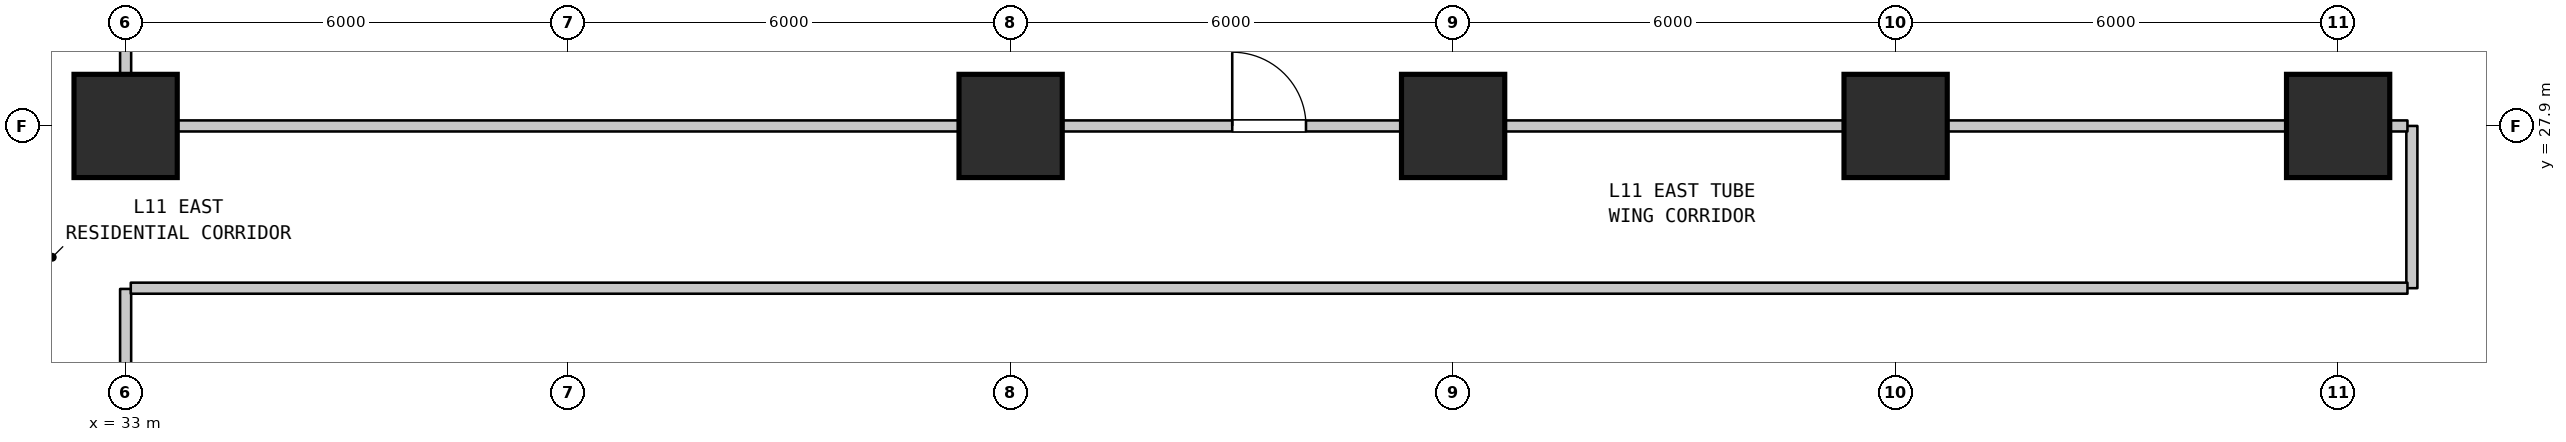
"""IFC4 building model, lengths in metres.
Left out: names, types, materials, properties, quantities, classifications, styles, units other than length and angle.
Written with IfcOpenShell. Run it as: python <this file> out.ifc"""

import sys

from ifc_helpers import new_model, si_unit, direction, frame, frame_2d, origin, origin_2d, place, context, subcontext, project, spatial, rectangle, extrude, element, fill, save


model = new_model("IFC4")
c1 = context("Model", 3, precision=1e-05, world=origin(), true_north=direction((0.0, 1.0)))
c2 = subcontext(c1, "Body", "Model", "MODEL_VIEW")
j1 = project(units=[si_unit("LENGTHUNIT", "METRE"), si_unit("PLANEANGLEUNIT", "RADIAN")], contexts=[c1])
p1 = place(None, origin())
s1 = spatial("IfcSite", under=j1, at=p1, CompositionType="ELEMENT")
p2 = place(p1, origin())
s2 = spatial("IfcBuilding", under=s1, at=p2, CompositionType="ELEMENT")
p3 = place(p2, frame((0.0, 0.0, 49.9)))
s3 = spatial("IfcBuildingStorey", under=s2, at=p3, CompositionType="ELEMENT", Elevation=49.9)
for number, where, z_axis, x_axis in (
    (1, (33.0, 27.9, 0.0), (0.0, 0.0, 1.0), (1.0, 0.0, 0.0)),
    (2, (45.0, 27.9, 0.0), (0.0, 0.0, 1.0), (1.0, 0.0, 0.0)),
    (3, (51.0, 27.9, 0.0), (0.0, 0.0, 1.0), (1.0, 0.0, 0.0)),
    (4, (57.0, 27.9, 0.0), (0.0, 0.0, 1.0), (1.0, 0.0, 0.0)),
    (5, (63.0, 27.9, 0.0), (0.0, 0.0, 1.0), (1.0, 0.0, 0.0)),
):
    element("IfcColumn", number, at=place(p3, frame(where, z_axis=z_axis, x_axis=x_axis)), inside=s3, PredefinedType="COLUMN", context=c2, shape_type="SweptSolid", body=[
        extrude(rectangle(XDim=1.4, YDim=1.4, at=origin_2d()), origin(), (0.0, 0.0, 1.0), 3.7),
    ])
p4 = place(p3, frame((33.0, 19.66, 0.0), z_axis=(0.0, 0.0, 1.0), x_axis=(0.0, 1.0, 0.0)))
e6 = element("IfcWall", 6, at=p4, inside=s3, PredefinedType="STANDARD", context=c2, shape_type="SweptSolid", body=[
    extrude(rectangle(XDim=6.03, YDim=0.15, at=frame_2d((3.015, 0.0))), origin(), (0.0, 0.0, 1.0), 2.885),
])
p5 = place(p3, frame((33.0, 27.91, 0.0), z_axis=(0.0, 0.0, 1.0), x_axis=(0.0, 1.0, 0.0)))
e7 = element("IfcWall", 7, at=p5, inside=s3, PredefinedType="STANDARD", context=c2, shape_type="SweptSolid", body=[
    extrude(rectangle(XDim=9.98, YDim=0.15, at=frame_2d((4.99, 0.0))), origin(), (0.0, 0.0, 1.0), 2.885),
])
p6 = place(p3, frame((64.0, 25.7, 0.0), z_axis=(0.0, 0.0, 1.0), x_axis=(0.0, 1.0, 0.0)))
e8 = element("IfcWall", 8, at=p6, inside=s3, PredefinedType="STANDARD", context=c2, shape_type="SweptSolid", body=[
    extrude(rectangle(XDim=2.2, YDim=0.15, at=frame_2d((1.1, 0.0))), origin(), (0.0, 0.0, 1.0), 3.385),
])
p7 = place(p3, frame((33.07, 25.7, 0.0), z_axis=(0.0, 0.0, 1.0), x_axis=(1.0, 0.0, 0.0)))
e9 = element("IfcWall", 9, at=p7, inside=s3, PredefinedType="STANDARD", context=c2, shape_type="SweptSolid", body=[
    extrude(rectangle(XDim=30.87, YDim=0.15, at=frame_2d((15.435, 0.0))), origin(), (0.0, 0.0, 1.0), 3.385),
])
p8 = place(p3, frame((33.07, 27.9, 0.0), z_axis=(0.0, 0.0, 1.0), x_axis=(1.0, 0.0, 0.0)))
e10 = element("IfcWall", 10, at=p8, inside=s3, PredefinedType="STANDARD", context=c2, shape_type="SweptSolid", body=[
    extrude(rectangle(XDim=30.87, YDim=0.15, at=frame_2d((15.435, 0.0))), origin(), (0.0, 0.0, 1.0), 2.885),
])
p9 = place(p8, frame((14.935, 0.0, 0.0)))
e11 = element("IfcOpeningElement", 11, at=p9, cuts=e10, PredefinedType="OPENING", context=c2, shape_type="SweptSolid", body=[
    extrude(rectangle(XDim=1.0, YDim=2.15, at=frame_2d((0.5, 1.075))), frame((0.0, 0.085, 0.0), z_axis=(0.0, -1.0, 0.0), x_axis=(1.0, 0.0, 0.0)), (0.0, 0.0, 1.0), 0.17),
])
p10 = place(p9, origin())
e12 = element("IfcDoor", 12, at=p10, inside=s3, OperationType="SINGLE_SWING_LEFT", PredefinedType="DOOR", context=c2, shape_type="SweptSolid", body=[
    extrude(rectangle(XDim=1.0, YDim=2.15, at=frame_2d((0.5, 1.075))), frame((0.0, 0.025, 0.0), z_axis=(0.0, -1.0, 0.0), x_axis=(1.0, 0.0, 0.0)), (0.0, 0.0, 1.0), 0.05),
])
fill(e11, e12)
save(model, sys.argv[1])
